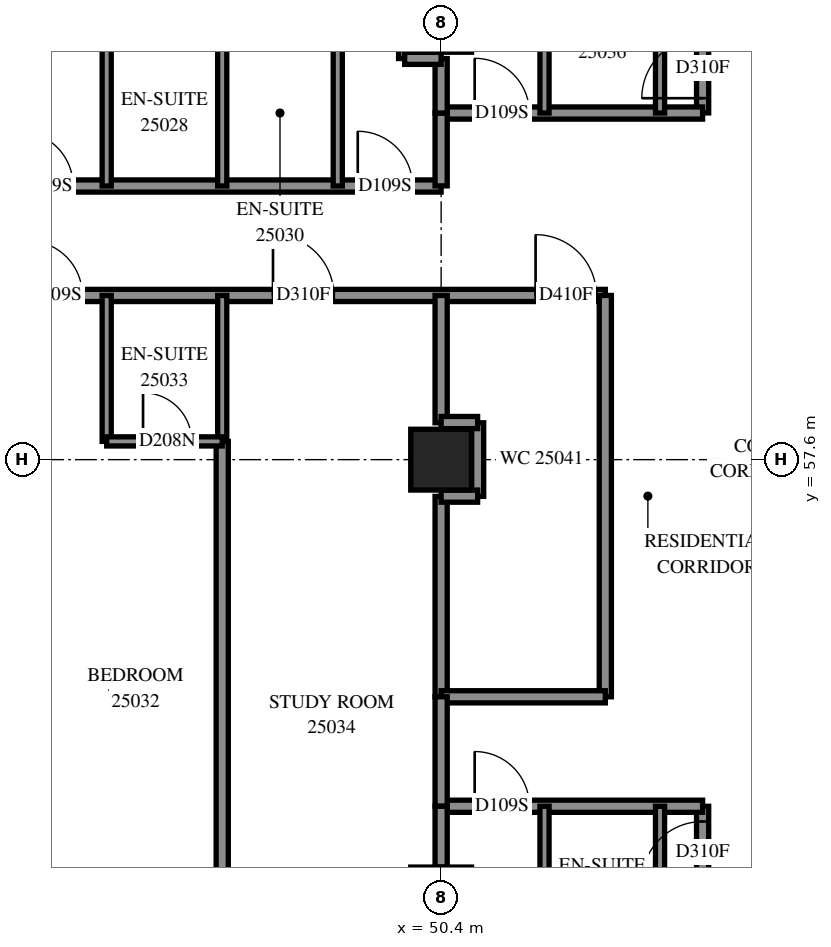
"""IFC4 building model, lengths in metres.
Left out: names, types, materials, properties, quantities, classifications, styles, units other than length and angle.
Written with IfcOpenShell. Run it as: python <this file> out.ifc"""

import sys

from ifc_helpers import new_model, si_unit, direction, frame, frame_2d, origin, origin_2d, place, context, subcontext, project, spatial, rectangle, extrude, element, fill, save


model = new_model("IFC4")
c1 = context("Model", 3, precision=1e-05, world=origin(), true_north=direction((0.0, 1.0)))
c2 = subcontext(c1, "Body", "Model", "MODEL_VIEW")
j1 = project(units=[si_unit("LENGTHUNIT", "METRE"), si_unit("PLANEANGLEUNIT", "RADIAN")], contexts=[c1])
p1 = place(None, origin())
s1 = spatial("IfcSite", under=j1, at=p1, CompositionType="ELEMENT")
p2 = place(p1, origin())
s2 = spatial("IfcBuilding", under=s1, at=p2, CompositionType="ELEMENT")
p3 = place(p2, frame((0.0, 0.0, 94.8)))
s3 = spatial("IfcBuildingStorey", under=s2, at=p3, CompositionType="ELEMENT", Elevation=94.8)
p4 = place(p3, frame((50.4, 57.6, 0.0), z_axis=(0.0, 0.0, 1.0), x_axis=(1.0, 0.0, 0.0)))
e1 = element("IfcColumn", 1, at=p4, inside=s3, PredefinedType="COLUMN", context=c2, shape_type="SweptSolid", body=[
    extrude(rectangle(XDim=1.0, YDim=1.0, at=origin_2d()), origin(), (0.0, 0.0, 1.0), 3.1),
])
p5 = place(p3, frame((28.802, 60.3, 0.0), z_axis=(0.0, 0.0, 1.0), x_axis=(1.0, 0.0, 0.0)))
e2 = element("IfcWall", 2, at=p5, inside=s3, PredefinedType="PARTITIONING", context=c2, shape_type="SweptSolid", body=[
    extrude(rectangle(XDim=24.298, YDim=0.2, at=frame_2d((12.149, 0.0))), origin(), (0.0, 0.0, 1.0), 3.1),
])
p6 = place(p5, frame((5.972, 0.0, 0.0)))
e3 = element("IfcOpeningElement", 3, at=p6, cuts=e2, PredefinedType="OPENING", context=c2, shape_type="SweptSolid", body=[
    extrude(rectangle(XDim=1.0, YDim=2.1, at=frame_2d((0.5, 1.05))), frame((0.0, 0.11, 0.0), z_axis=(0.0, -1.0, 0.0), x_axis=(1.0, 0.0, 0.0)), (0.0, 0.0, 1.0), 0.22),
])
p7 = place(p5, frame((11.323, 0.0, 0.0)))
e4 = element("IfcOpeningElement", 4, at=p7, cuts=e2, PredefinedType="OPENING", context=c2, shape_type="SweptSolid", body=[
    extrude(rectangle(XDim=1.0, YDim=2.1, at=frame_2d((0.5, 1.05))), frame((0.0, 0.11, 0.0), z_axis=(0.0, -1.0, 0.0), x_axis=(1.0, 0.0, 0.0)), (0.0, 0.0, 1.0), 0.22),
])
p8 = place(p5, frame((14.798, 0.0, 0.0)))
e5 = element("IfcOpeningElement", 5, at=p8, cuts=e2, PredefinedType="OPENING", context=c2, shape_type="SweptSolid", body=[
    extrude(rectangle(XDim=0.9, YDim=2.1, at=frame_2d((0.45, 1.05))), frame((0.0, 0.11, 0.0), z_axis=(0.0, -1.0, 0.0), x_axis=(1.0, 0.0, 0.0)), (0.0, 0.0, 1.0), 0.22),
])
p9 = place(p5, frame((18.833, 0.0, 0.0)))
e6 = element("IfcOpeningElement", 6, at=p9, cuts=e2, PredefinedType="OPENING", context=c2, shape_type="SweptSolid", body=[
    extrude(rectangle(XDim=1.0, YDim=2.1, at=frame_2d((0.5, 1.05))), frame((0.0, 0.11, 0.0), z_axis=(0.0, -1.0, 0.0), x_axis=(1.0, 0.0, 0.0)), (0.0, 0.0, 1.0), 0.22),
])
p10 = place(p5, frame((23.151, 0.0, 0.0)))
e7 = element("IfcOpeningElement", 7, at=p10, cuts=e2, PredefinedType="OPENING", context=c2, shape_type="SweptSolid", body=[
    extrude(rectangle(XDim=1.0, YDim=2.1, at=frame_2d((0.5, 1.05))), frame((0.0, 0.11, 0.0), z_axis=(0.0, -1.0, 0.0), x_axis=(1.0, 0.0, 0.0)), (0.0, 0.0, 1.0), 0.22),
])
p11 = place(p3, frame((33.3, 62.1, 0.0), z_axis=(0.0, 0.0, 1.0), x_axis=(1.0, 0.0, 0.0)))
e8 = element("IfcWall", 8, at=p11, inside=s3, PredefinedType="PARTITIONING", context=c2, shape_type="SweptSolid", body=[
    extrude(rectangle(XDim=17.1, YDim=0.2, at=frame_2d((8.55, 0.0))), origin(), (0.0, 0.0, 1.0), 3.1),
])
p12 = place(p11, frame((6.258, 0.0, 0.0)))
e9 = element("IfcOpeningElement", 9, at=p12, cuts=e8, PredefinedType="OPENING", context=c2, shape_type="SweptSolid", body=[
    extrude(rectangle(XDim=1.0, YDim=2.1, at=frame_2d((0.5, 1.05))), frame((0.0, 0.11, 0.0), z_axis=(0.0, -1.0, 0.0), x_axis=(1.0, 0.0, 0.0)), (0.0, 0.0, 1.0), 0.22),
])
p13 = place(p11, frame((10.148, 0.0, 0.0)))
e10 = element("IfcOpeningElement", 10, at=p13, cuts=e8, PredefinedType="OPENING", context=c2, shape_type="SweptSolid", body=[
    extrude(rectangle(XDim=0.9, YDim=2.1, at=frame_2d((0.45, 1.05))), frame((0.0, 0.11, 0.0), z_axis=(0.0, -1.0, 0.0), x_axis=(1.0, 0.0, 0.0)), (0.0, 0.0, 1.0), 0.22),
])
p14 = place(p11, frame((15.729, 0.0, 0.0)))
e11 = element("IfcOpeningElement", 11, at=p14, cuts=e8, PredefinedType="OPENING", context=c2, shape_type="SweptSolid", body=[
    extrude(rectangle(XDim=0.9, YDim=2.1, at=frame_2d((0.45, 1.05))), frame((0.0, 0.11, 0.0), z_axis=(0.0, -1.0, 0.0), x_axis=(1.0, 0.0, 0.0)), (0.0, 0.0, 1.0), 0.22),
])
p15 = place(p3, frame((46.8, 49.75, 0.0), z_axis=(0.0, 0.0, 1.0), x_axis=(0.0, 1.0, 0.0)))
e12 = element("IfcWall", 12, at=p15, inside=s3, PredefinedType="PARTITIONING", context=c2, shape_type="SweptSolid", body=[
    extrude(rectangle(XDim=8.15, YDim=0.2, at=frame_2d((4.075, 0.0))), origin(), (0.0, 0.0, 1.0), 3.1),
])
p16 = place(p3, frame((53.1, 53.7, 0.0), z_axis=(0.0, 0.0, 1.0), x_axis=(0.0, 1.0, 0.0)))
e13 = element("IfcWall", 13, at=p16, inside=s3, PredefinedType="PARTITIONING", context=c2, shape_type="SweptSolid", body=[
    extrude(rectangle(XDim=6.6, YDim=0.2, at=frame_2d((3.3, 0.0))), origin(), (0.0, 0.0, 1.0), 3.1),
])
p17 = place(p3, frame((54.7, 47.5, 0.0), z_axis=(0.0, 0.0, 1.0), x_axis=(0.0, 1.0, 0.0)))
e14 = element("IfcWall", 14, at=p17, inside=s3, PredefinedType="PARTITIONING", context=c2, shape_type="SweptSolid", body=[
    extrude(rectangle(XDim=4.4, YDim=0.2, at=frame_2d((2.2, 0.0))), origin(), (0.0, 0.0, 1.0), 3.1),
])
p18 = place(p17, frame((3.149, 0.0, 0.0)))
e15 = element("IfcOpeningElement", 15, at=p18, cuts=e14, PredefinedType="OPENING", context=c2, shape_type="SweptSolid", body=[
    extrude(rectangle(XDim=1.0, YDim=2.1, at=frame_2d((0.5, 1.05))), frame((0.0, 0.11, 0.0), z_axis=(0.0, -1.0, 0.0), x_axis=(1.0, 0.0, 0.0)), (0.0, 0.0, 1.0), 0.22),
])
p19 = place(p3, frame((54.7, 63.302, 0.0), z_axis=(0.0, 0.0, 1.0), x_axis=(0.0, 1.0, 0.0)))
e16 = element("IfcWall", 16, at=p19, inside=s3, PredefinedType="PARTITIONING", context=c2, shape_type="SweptSolid", body=[
    extrude(rectangle(XDim=4.398, YDim=0.2, at=frame_2d((2.199, 0.0))), origin(), (0.0, 0.0, 1.0), 3.1),
])
p20 = place(p19, frame((0.242, 0.0, 0.0)))
e17 = element("IfcOpeningElement", 17, at=p20, cuts=e16, PredefinedType="OPENING", context=c2, shape_type="SweptSolid", body=[
    extrude(rectangle(XDim=1.0, YDim=2.1, at=frame_2d((0.5, 1.05))), frame((0.0, 0.11, 0.0), z_axis=(0.0, -1.0, 0.0), x_axis=(1.0, 0.0, 0.0)), (0.0, 0.0, 1.0), 0.22),
])
p21 = place(p3, frame((50.4, 51.9, 0.0), z_axis=(0.0, 0.0, 1.0), x_axis=(1.0, 0.0, 0.0)))
e18 = element("IfcWall", 18, at=p21, inside=s3, PredefinedType="PARTITIONING", context=c2, shape_type="SweptSolid", body=[
    extrude(rectangle(XDim=4.3, YDim=0.2, at=frame_2d((2.15, 0.0))), origin(), (0.0, 0.0, 1.0), 3.1),
])
p22 = place(p21, frame((0.552, 0.0, 0.0)))
e19 = element("IfcOpeningElement", 19, at=p22, cuts=e18, PredefinedType="OPENING", context=c2, shape_type="SweptSolid", body=[
    extrude(rectangle(XDim=0.9, YDim=2.1, at=frame_2d((0.45, 1.05))), frame((0.0, 0.11, 0.0), z_axis=(0.0, -1.0, 0.0), x_axis=(1.0, 0.0, 0.0)), (0.0, 0.0, 1.0), 0.22),
])
p23 = place(p3, frame((50.4, 63.3, 0.0), z_axis=(0.0, 0.0, 1.0), x_axis=(1.0, 0.0, 0.0)))
e20 = element("IfcWall", 20, at=p23, inside=s3, PredefinedType="PARTITIONING", context=c2, shape_type="SweptSolid", body=[
    extrude(rectangle(XDim=4.3, YDim=0.2, at=frame_2d((2.15, 0.0))), origin(), (0.0, 0.0, 1.0), 3.1),
])
p24 = place(p23, frame((0.552, 0.0, 0.0)))
e21 = element("IfcOpeningElement", 21, at=p24, cuts=e20, PredefinedType="OPENING", context=c2, shape_type="SweptSolid", body=[
    extrude(rectangle(XDim=0.9, YDim=2.1, at=frame_2d((0.45, 1.05))), frame((0.0, 0.11, 0.0), z_axis=(0.0, -1.0, 0.0), x_axis=(1.0, 0.0, 0.0)), (0.0, 0.0, 1.0), 0.22),
])
p25 = place(p3, frame((50.4, 53.7, 0.0), z_axis=(0.0, 0.0, 1.0), x_axis=(0.0, 1.0, 0.0)))
e22 = element("IfcWall", 22, at=p25, inside=s3, PredefinedType="PARTITIONING", context=c2, shape_type="SweptSolid", body=[
    extrude(rectangle(XDim=3.296, YDim=0.2, at=frame_2d((1.648, 0.0))), origin(), (0.0, 0.0, 1.0), 3.1),
])
p26 = place(p3, frame((50.4, 53.7, 0.0), z_axis=(0.0, 0.0, 1.0), x_axis=(1.0, 0.0, 0.0)))
e23 = element("IfcWall", 23, at=p26, inside=s3, PredefinedType="PARTITIONING", context=c2, shape_type="SweptSolid", body=[
    extrude(rectangle(XDim=2.7, YDim=0.2, at=frame_2d((1.35, 0.0))), origin(), (0.0, 0.0, 1.0), 3.1),
])
for number, where, z_axis, x_axis in (
    (24, (52.1, 63.3, 0.0), (0.0, 0.0, 1.0), (0.0, 1.0, 0.0)),
    (25, (54.0, 63.3, 0.0), (0.0, 0.0, 1.0), (0.0, 1.0, 0.0)),
    (26, (44.9, 57.9, 0.0), (0.0, 0.0, 1.0), (0.0, 1.0, 0.0)),
    (27, (44.9, 62.1, 0.0), (0.0, 0.0, 1.0), (0.0, 1.0, 0.0)),
    (28, (46.8, 57.9, 0.0), (0.0, 0.0, 1.0), (0.0, 1.0, 0.0)),
    (29, (46.8, 62.1, 0.0), (0.0, 0.0, 1.0), (0.0, 1.0, 0.0)),
    (30, (48.7, 62.1, 0.0), (0.0, 0.0, 1.0), (0.0, 1.0, 0.0)),
    (31, (52.1, 49.5, 0.0), (0.0, 0.0, 1.0), (0.0, 1.0, 0.0)),
    (32, (54.0, 49.5, 0.0), (0.0, 0.0, 1.0), (0.0, 1.0, 0.0)),
):
    element("IfcWall", number, at=place(p3, frame(where, z_axis=z_axis, x_axis=x_axis)), inside=s3, PredefinedType="PARTITIONING", context=c2, shape_type="SweptSolid", body=[
        extrude(rectangle(XDim=2.4, YDim=0.15, at=frame_2d((1.2, 0.0))), origin(), (0.0, 0.0, 1.0), 3.1),
    ])
p27 = place(p3, frame((50.4, 58.206, 0.0), z_axis=(0.0, 0.0, 1.0), x_axis=(0.0, 1.0, 0.0)))
e33 = element("IfcWall", 33, at=p27, inside=s3, PredefinedType="PARTITIONING", context=c2, shape_type="SweptSolid", body=[
    extrude(rectangle(XDim=2.094, YDim=0.2, at=frame_2d((1.047, 0.0))), origin(), (0.0, 0.0, 1.0), 3.1),
])
p28 = place(p3, frame((44.9, 57.9, 0.0), z_axis=(0.0, 0.0, 1.0), x_axis=(1.0, 0.0, 0.0)))
e34 = element("IfcWall", 34, at=p28, inside=s3, PredefinedType="PARTITIONING", context=c2, shape_type="SweptSolid", body=[
    extrude(rectangle(XDim=1.9, YDim=0.15, at=frame_2d((0.95, 0.0))), origin(), (0.0, 0.0, 1.0), 3.1),
])
p29 = place(p28, frame((0.598, 0.0, 0.0)))
e35 = element("IfcOpeningElement", 35, at=p29, cuts=e34, PredefinedType="OPENING", context=c2, shape_type="SweptSolid", body=[
    extrude(rectangle(XDim=0.8, YDim=2.1, at=frame_2d((0.4, 1.05))), frame((0.0, 0.085, 0.0), z_axis=(0.0, -1.0, 0.0), x_axis=(1.0, 0.0, 0.0)), (0.0, 0.0, 1.0), 0.17),
])
p30 = place(p3, frame((50.4, 51.9, 0.0), z_axis=(0.0, 0.0, 1.0), x_axis=(0.0, 1.0, 0.0)))
e36 = element("IfcWall", 36, at=p30, inside=s3, PredefinedType="PARTITIONING", context=c2, shape_type="SweptSolid", body=[
    extrude(rectangle(XDim=1.8, YDim=0.2, at=frame_2d((0.9, 0.0))), origin(), (0.0, 0.0, 1.0), 3.1),
])
p31 = place(p3, frame((51.0, 56.996, 0.0), z_axis=(0.0, 0.0, 1.0), x_axis=(0.0, 1.0, 0.0)))
e37 = element("IfcWall", 37, at=p31, inside=s3, PredefinedType="PARTITIONING", context=c2, shape_type="SweptSolid", body=[
    extrude(rectangle(XDim=1.21, YDim=0.2, at=frame_2d((0.605, 0.0))), origin(), (0.0, 0.0, 1.0), 3.1),
])
p32 = place(p3, frame((49.8, 64.196, 0.0), z_axis=(0.0, 0.0, 1.0), x_axis=(0.0, 1.0, 0.0)))
e38 = element("IfcWall", 38, at=p32, inside=s3, PredefinedType="PARTITIONING", context=c2, shape_type="SweptSolid", body=[
    extrude(rectangle(XDim=1.208, YDim=0.2, at=frame_2d((0.604, 0.0))), origin(), (0.0, 0.0, 1.0), 3.1),
])
p33 = place(p3, frame((50.4, 62.102, 0.0), z_axis=(0.0, 0.0, 1.0), x_axis=(0.0, 1.0, 0.0)))
e39 = element("IfcWall", 39, at=p33, inside=s3, PredefinedType="PARTITIONING", context=c2, shape_type="SweptSolid", body=[
    extrude(rectangle(XDim=1.198, YDim=0.2, at=frame_2d((0.599, 0.0))), origin(), (0.0, 0.0, 1.0), 3.1),
])
p34 = place(p3, frame((50.4, 50.9, 0.0), z_axis=(0.0, 0.0, 1.0), x_axis=(0.0, 1.0, 0.0)))
e40 = element("IfcWall", 40, at=p34, inside=s3, PredefinedType="PARTITIONING", context=c2, shape_type="SweptSolid", body=[
    extrude(rectangle(XDim=1.0, YDim=0.2, at=frame_2d((0.5, 0.0))), origin(), (0.0, 0.0, 1.0), 3.1),
])
p35 = place(p3, frame((50.4, 63.3, 0.0), z_axis=(0.0, 0.0, 1.0), x_axis=(0.0, 1.0, 0.0)))
e41 = element("IfcWall", 41, at=p35, inside=s3, PredefinedType="PARTITIONING", context=c2, shape_type="SweptSolid", body=[
    extrude(rectangle(XDim=0.896, YDim=0.2, at=frame_2d((0.448, 0.0))), origin(), (0.0, 0.0, 1.0), 3.1),
])
for number, where, z_axis, x_axis in (
    (42, (49.8, 64.2, 0.0), (0.0, 0.0, 1.0), (1.0, 0.0, 0.0)),
    (43, (50.4, 58.21, 0.0), (0.0, 0.0, 1.0), (1.0, 0.0, 0.0)),
    (44, (50.4, 57.0, 0.0), (0.0, 0.0, 1.0), (1.0, 0.0, 0.0)),
):
    element("IfcWall", number, at=place(p3, frame(where, z_axis=z_axis, x_axis=x_axis)), inside=s3, PredefinedType="PARTITIONING", context=c2, shape_type="SweptSolid", body=[
        extrude(rectangle(XDim=0.6, YDim=0.2, at=frame_2d((0.3, 0.0))), origin(), (0.0, 0.0, 1.0), 3.1),
    ])
p36 = place(p13, origin())
e45 = element("IfcDoor", 45, at=p36, inside=s3, OperationType="SINGLE_SWING_RIGHT", PredefinedType="DOOR", context=c2, shape_type="SweptSolid", body=[
    extrude(rectangle(XDim=0.9, YDim=2.1, at=frame_2d((0.45, 1.05))), frame((0.0, 0.025, 0.0), z_axis=(0.0, -1.0, 0.0), x_axis=(1.0, 0.0, 0.0)), (0.0, 0.0, 1.0), 0.05),
])
fill(e10, e45)
p37 = place(p14, origin())
e46 = element("IfcDoor", 46, at=p37, inside=s3, OperationType="SINGLE_SWING_LEFT", PredefinedType="DOOR", context=c2, shape_type="SweptSolid", body=[
    extrude(rectangle(XDim=0.9, YDim=2.1, at=frame_2d((0.45, 1.05))), frame((0.0, 0.025, 0.0), z_axis=(0.0, -1.0, 0.0), x_axis=(1.0, 0.0, 0.0)), (0.0, 0.0, 1.0), 0.05),
])
fill(e11, e46)
p38 = place(p8, origin())
e47 = element("IfcDoor", 47, at=p38, inside=s3, OperationType="SINGLE_SWING_LEFT", PredefinedType="DOOR", context=c2, shape_type="SweptSolid", body=[
    extrude(rectangle(XDim=0.9, YDim=2.1, at=frame_2d((0.45, 1.05))), frame((0.0, 0.025, 0.0), z_axis=(0.0, -1.0, 0.0), x_axis=(1.0, 0.0, 0.0)), (0.0, 0.0, 1.0), 0.05),
])
fill(e5, e47)
p39 = place(p29, origin())
e48 = element("IfcDoor", 48, at=p39, inside=s3, OperationType="SINGLE_SWING_RIGHT", PredefinedType="DOOR", context=c2, shape_type="SweptSolid", body=[
    extrude(rectangle(XDim=0.8, YDim=2.1, at=frame_2d((0.4, 1.05))), frame((0.0, 0.025, 0.0), z_axis=(0.0, -1.0, 0.0), x_axis=(1.0, 0.0, 0.0)), (0.0, 0.0, 1.0), 0.05),
])
fill(e35, e48)
p40 = place(p9, origin())
e49 = element("IfcDoor", 49, at=p40, inside=s3, OperationType="SINGLE_SWING_RIGHT", PredefinedType="DOOR", context=c2, shape_type="SweptSolid", body=[
    extrude(rectangle(XDim=1.0, YDim=2.1, at=frame_2d((0.5, 1.05))), frame((0.0, 0.025, 0.0), z_axis=(0.0, -1.0, 0.0), x_axis=(1.0, 0.0, 0.0)), (0.0, 0.0, 1.0), 0.05),
])
fill(e6, e49)
p41 = place(p24, origin())
e50 = element("IfcDoor", 50, at=p41, inside=s3, OperationType="SINGLE_SWING_RIGHT", PredefinedType="DOOR", context=c2, shape_type="SweptSolid", body=[
    extrude(rectangle(XDim=0.9, YDim=2.1, at=frame_2d((0.45, 1.05))), frame((0.0, 0.025, 0.0), z_axis=(0.0, -1.0, 0.0), x_axis=(1.0, 0.0, 0.0)), (0.0, 0.0, 1.0), 0.05),
])
fill(e21, e50)
p42 = place(p20, origin())
e51 = element("IfcDoor", 51, at=p42, inside=s3, OperationType="SINGLE_SWING_LEFT", PredefinedType="DOOR", context=c2, shape_type="SweptSolid", body=[
    extrude(rectangle(XDim=1.0, YDim=2.1, at=frame_2d((0.5, 1.05))), frame((0.0, 0.025, 0.0), z_axis=(0.0, -1.0, 0.0), x_axis=(1.0, 0.0, 0.0)), (0.0, 0.0, 1.0), 0.05),
])
fill(e17, e51)
p43 = place(p10, origin())
e52 = element("IfcDoor", 52, at=p43, inside=s3, OperationType="SINGLE_SWING_LEFT", PredefinedType="DOOR", context=c2, shape_type="SweptSolid", body=[
    extrude(rectangle(XDim=1.0, YDim=2.1, at=frame_2d((0.5, 1.05))), frame((0.0, 0.025, 0.0), z_axis=(0.0, -1.0, 0.0), x_axis=(1.0, 0.0, 0.0)), (0.0, 0.0, 1.0), 0.05),
])
fill(e7, e52)
p44 = place(p22, origin())
e53 = element("IfcDoor", 53, at=p44, inside=s3, OperationType="SINGLE_SWING_LEFT", PredefinedType="DOOR", context=c2, shape_type="SweptSolid", body=[
    extrude(rectangle(XDim=0.9, YDim=2.1, at=frame_2d((0.45, 1.05))), frame((0.0, 0.025, 0.0), z_axis=(0.0, -1.0, 0.0), x_axis=(1.0, 0.0, 0.0)), (0.0, 0.0, 1.0), 0.05),
])
fill(e19, e53)
p45 = place(p18, origin())
e54 = element("IfcDoor", 54, at=p45, inside=s3, OperationType="SINGLE_SWING_RIGHT", PredefinedType="DOOR", context=c2, shape_type="SweptSolid", body=[
    extrude(rectangle(XDim=1.0, YDim=2.1, at=frame_2d((0.5, 1.05))), frame((0.0, 0.025, 0.0), z_axis=(0.0, -1.0, 0.0), x_axis=(1.0, 0.0, 0.0)), (0.0, 0.0, 1.0), 0.05),
])
fill(e15, e54)
save(model, sys.argv[1])
